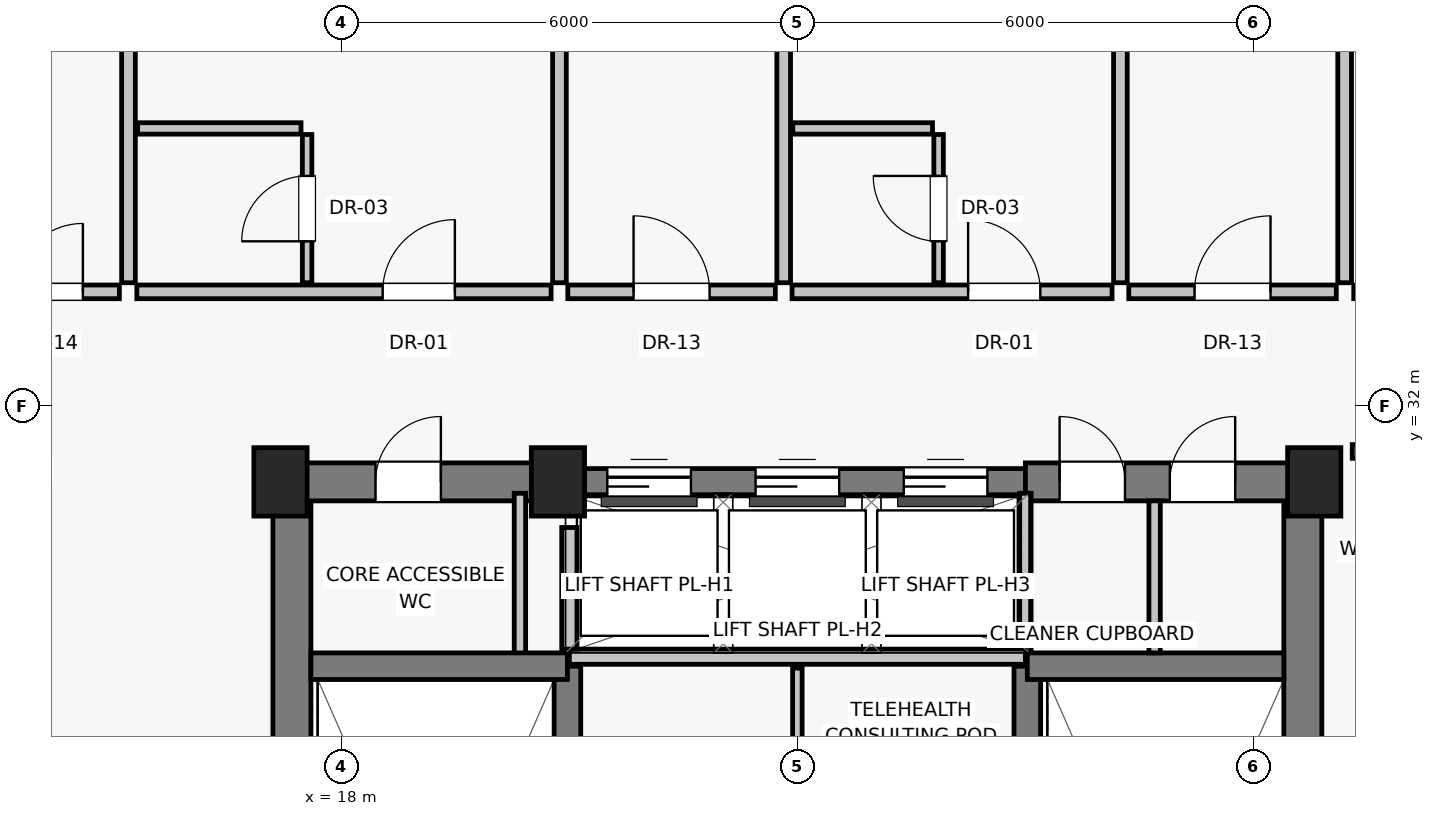
"""IFC4 building model, lengths in metres.
Left out: names, types, materials, properties, quantities, classifications, styles, units other than length and angle.
Written with IfcOpenShell. Run it as: python <this file> out.ifc"""

import sys

from ifc_helpers import new_model, si_unit, direction, frame, frame_2d, origin, origin_2d, place, context, subcontext, project, spatial, rectangle, extrude, source, transform, mapped, element, fill, save


model = new_model("IFC4")
c1 = context("Model", 3, precision=1e-05, world=origin(), true_north=direction((0.0, 1.0)))
c2 = subcontext(c1, "Body", "Model", "MODEL_VIEW")
j1 = project(units=[si_unit("LENGTHUNIT", "METRE"), si_unit("PLANEANGLEUNIT", "RADIAN")], contexts=[c1])
p1 = place(None, origin())
s1 = spatial("IfcSite", under=j1, at=p1, CompositionType="ELEMENT")
p2 = place(p1, origin())
s2 = spatial("IfcBuilding", under=s1, at=p2, CompositionType="ELEMENT")
p3 = place(p2, frame((0.0, 0.0, 195.1)))
s3 = spatial("IfcBuildingStorey", under=s2, at=p3, CompositionType="ELEMENT", Elevation=195.1)
for number, where, z_axis, x_axis in (
    (1, (17.2, 31.0, 0.0), (0.0, 0.0, 1.0), (1.0, 0.0, 0.0)),
    (2, (20.85, 31.0, 0.0), (0.0, 0.0, 1.0), (1.0, 0.0, 0.0)),
    (3, (30.8, 31.0, 0.0), (0.0, 0.0, 1.0), (1.0, 0.0, 0.0)),
):
    element("IfcColumn", number, at=place(p3, frame(where, z_axis=z_axis, x_axis=x_axis)), inside=s3, PredefinedType="PILASTER", context=c2, shape_type="SweptSolid", body=[
        extrude(rectangle(XDim=0.7, YDim=0.9, at=origin_2d()), origin(), (0.0, 0.0, 1.0), 3.25),
    ])
for number, where, z_axis, x_axis in (
    (4, (17.35, 16.8, 0.0), (0.0, 0.0, 1.0), (0.0, 1.0, 0.0)),
    (5, (30.65, 16.8, 0.0), (0.0, 0.0, 1.0), (0.0, 1.0, 0.0)),
):
    element("IfcWall", number, at=place(p3, frame(where, z_axis=z_axis, x_axis=x_axis)), inside=s3, PredefinedType="SHEAR", context=c2, shape_type="SweptSolid", body=[
        extrude(rectangle(XDim=14.2, YDim=0.5, at=frame_2d((7.1, 0.0))), origin(), (0.0, 0.0, 1.0), 3.015),
    ])
p4 = place(p3, frame((17.2, 31.0, 0.0), z_axis=(0.0, 0.0, 1.0), x_axis=(1.0, 0.0, 0.0)))
e6 = element("IfcWall", 6, at=p4, inside=s3, PredefinedType="SHEAR", context=c2, shape_type="SweptSolid", body=[
    extrude(rectangle(XDim=3.8, YDim=0.5, at=frame_2d((1.9, 0.0))), origin(), (0.0, 0.0, 1.0), 3.015),
])
p5 = place(p4, frame((1.25, 0.0, 0.0)))
e7 = element("IfcOpeningElement", 7, at=p5, cuts=e6, PredefinedType="OPENING", context=c2, shape_type="SweptSolid", body=[
    extrude(rectangle(XDim=0.86, YDim=2.01, at=frame_2d((0.43, 1.005))), frame((0.0, 0.26, 0.0), z_axis=(0.0, -1.0, 0.0), x_axis=(1.0, 0.0, 0.0)), (0.0, 0.0, 1.0), 0.52),
])
p6 = place(p3, frame((21.0, 31.0, 0.0), z_axis=(0.0, 0.0, 1.0), x_axis=(1.0, 0.0, 0.0)))
e8 = element("IfcWall", 8, at=p6, inside=s3, PredefinedType="SHEAR", context=c2, shape_type="SweptSolid", body=[
    extrude(rectangle(XDim=6.0, YDim=0.35, at=frame_2d((3.0, 0.0))), origin(), (0.0, 0.0, 1.0), 3.015),
])
p7 = place(p6, frame((0.5, 0.0, 0.0)))
e9 = element("IfcOpeningElement", 9, at=p7, cuts=e8, PredefinedType="OPENING", context=c2, shape_type="SweptSolid", body=[
    extrude(rectangle(XDim=1.1, YDim=2.08, at=frame_2d((0.55, 1.04))), frame((0.0, 0.185, 0.0), z_axis=(0.0, -1.0, 0.0), x_axis=(1.0, 0.0, 0.0)), (0.0, 0.0, 1.0), 0.37),
])
p8 = place(p6, frame((2.45, 0.0, 0.0)))
e10 = element("IfcOpeningElement", 10, at=p8, cuts=e8, PredefinedType="OPENING", context=c2, shape_type="SweptSolid", body=[
    extrude(rectangle(XDim=1.1, YDim=2.08, at=frame_2d((0.55, 1.04))), frame((0.0, 0.185, 0.0), z_axis=(0.0, -1.0, 0.0), x_axis=(1.0, 0.0, 0.0)), (0.0, 0.0, 1.0), 0.37),
])
p9 = place(p6, frame((4.4, 0.0, 0.0)))
e11 = element("IfcOpeningElement", 11, at=p9, cuts=e8, PredefinedType="OPENING", context=c2, shape_type="SweptSolid", body=[
    extrude(rectangle(XDim=1.1, YDim=2.08, at=frame_2d((0.55, 1.04))), frame((0.0, 0.185, 0.0), z_axis=(0.0, -1.0, 0.0), x_axis=(1.0, 0.0, 0.0)), (0.0, 0.0, 1.0), 0.37),
])
p10 = place(p3, frame((27.0, 31.0, 0.0), z_axis=(0.0, 0.0, 1.0), x_axis=(1.0, 0.0, 0.0)))
e12 = element("IfcWall", 12, at=p10, inside=s3, PredefinedType="SHEAR", context=c2, shape_type="SweptSolid", body=[
    extrude(rectangle(XDim=3.8, YDim=0.5, at=frame_2d((1.9, 0.0))), origin(), (0.0, 0.0, 1.0), 3.015),
])
p11 = place(p10, frame((0.45, 0.0, 0.0)))
e13 = element("IfcOpeningElement", 13, at=p11, cuts=e12, PredefinedType="OPENING", context=c2, shape_type="SweptSolid", body=[
    extrude(rectangle(XDim=0.86, YDim=2.01, at=frame_2d((0.43, 1.005))), frame((0.0, 0.26, 0.0), z_axis=(0.0, -1.0, 0.0), x_axis=(1.0, 0.0, 0.0)), (0.0, 0.0, 1.0), 0.52),
])
p12 = place(p10, frame((1.9, 0.0, 0.0)))
e14 = element("IfcOpeningElement", 14, at=p12, cuts=e12, PredefinedType="OPENING", context=c2, shape_type="SweptSolid", body=[
    extrude(rectangle(XDim=0.86, YDim=2.01, at=frame_2d((0.43, 1.005))), frame((0.0, 0.26, 0.0), z_axis=(0.0, -1.0, 0.0), x_axis=(1.0, 0.0, 0.0)), (0.0, 0.0, 1.0), 0.52),
])
for number, where, z_axis, x_axis in (
    (15, (20.35, 28.65, 0.0), (0.0, 0.0, 1.0), (0.0, 1.0, 0.0)),
    (16, (27.0, 28.65, 0.0), (0.0, 0.0, 1.0), (0.0, 1.0, 0.0)),
):
    element("IfcWall", number, at=place(p3, frame(where, z_axis=z_axis, x_axis=x_axis)), inside=s3, PredefinedType="PARTITIONING", context=c2, shape_type="SweptSolid", body=[
        extrude(rectangle(XDim=2.2, YDim=0.15, at=frame_2d((1.1, 0.0))), origin(), (0.0, 0.0, 1.0), 3.015),
    ])
for number, where, z_axis, x_axis in (
    (17, (20.975, 19.8, 0.0), (0.0, 0.0, 1.0), (0.0, 1.0, 0.0)),
    (18, (27.025, 19.8, 0.0), (0.0, 0.0, 1.0), (0.0, 1.0, 0.0)),
):
    element("IfcWall", number, at=place(p3, frame(where, z_axis=z_axis, x_axis=x_axis)), inside=s3, PredefinedType="SHEAR", context=c2, shape_type="SweptSolid", body=[
        extrude(rectangle(XDim=8.775, YDim=0.35, at=frame_2d((4.387, 0.0))), origin(), (0.0, 0.0, 1.0), 3.015),
    ])
for number, where, z_axis, x_axis in (
    (19, (17.6, 28.575, 0.0), (0.0, 0.0, 1.0), (1.0, 0.0, 0.0)),
    (20, (27.025, 28.575, 0.0), (0.0, 0.0, 1.0), (1.0, 0.0, 0.0)),
):
    element("IfcWall", number, at=place(p3, frame(where, z_axis=z_axis, x_axis=x_axis)), inside=s3, PredefinedType="SHEAR", context=c2, shape_type="SweptSolid", body=[
        extrude(rectangle(XDim=3.375, YDim=0.35, at=frame_2d((1.688, 0.0))), origin(), (0.0, 0.0, 1.0), 3.015),
    ])
p13 = place(p3, frame((21.0, 28.7, 0.0), z_axis=(0.0, 0.0, 1.0), x_axis=(1.0, 0.0, 0.0)))
e21 = element("IfcWall", 21, at=p13, inside=s3, PredefinedType="SOLIDWALL", context=c2, shape_type="SweptSolid", body=[
    extrude(rectangle(XDim=6.0, YDim=0.2, at=frame_2d((3.0, 0.0))), origin(), (0.0, 0.0, 1.0), 3.015),
])
p14 = place(p3, frame((21.0, 28.8, 0.0), z_axis=(0.0, 0.0, 1.0), x_axis=(0.0, 1.0, 0.0)))
e22 = element("IfcWall", 22, at=p14, inside=s3, PredefinedType="SOLIDWALL", context=c2, shape_type="SweptSolid", body=[
    extrude(rectangle(XDim=1.6, YDim=0.2, at=frame_2d((0.8, 0.0))), origin(), (0.0, 0.0, 1.0), 3.015),
])
p15 = place(p3, frame((24.0, 24.2, 0.0), z_axis=(0.0, 0.0, 1.0), x_axis=(0.0, 1.0, 0.0)))
e23 = element("IfcWall", 23, at=p15, inside=s3, PredefinedType="PARTITIONING", context=c2, shape_type="SweptSolid", body=[
    extrude(rectangle(XDim=4.35, YDim=0.125, at=frame_2d((2.175, 0.0))), origin(), (0.0, 0.0, 1.0), 3.015),
])
p16 = place(p15, frame((1.6, 0.0, 0.0)))
e24 = element("IfcOpeningElement", 24, at=p16, cuts=e23, PredefinedType="OPENING", context=c2, shape_type="SweptSolid", body=[
    extrude(rectangle(XDim=0.9, YDim=2.01, at=frame_2d((0.45, 1.005))), frame((0.0, 0.073, 0.0), z_axis=(0.0, -1.0, 0.0), x_axis=(1.0, 0.0, 0.0)), (0.0, 0.0, 1.0), 0.145),
])
p17 = place(p3, frame((28.7, 28.75, 0.0), z_axis=(0.0, 0.0, 1.0), x_axis=(0.0, 1.0, 0.0)))
e25 = element("IfcWall", 25, at=p17, inside=s3, PredefinedType="PARTITIONING", context=c2, shape_type="SweptSolid", body=[
    extrude(rectangle(XDim=2.0, YDim=0.15, at=frame_2d((1.0, 0.0))), origin(), (0.0, 0.0, 1.0), 3.015),
])
p18 = place(p3, frame((15.2, 33.62, 0.0), z_axis=(0.0, 0.0, 1.0), x_axis=(0.0, 1.0, 0.0)))
e26 = element("IfcWall", 26, at=p18, inside=s3, PredefinedType="PARTITIONING", context=c2, shape_type="SweptSolid", body=[
    extrude(rectangle(XDim=5.825, YDim=0.18, at=frame_2d((2.913, 0.0))), origin(), (0.0, 0.0, 1.0), 3.015),
])
p19 = place(p3, frame((31.2, 33.62, 0.0), z_axis=(0.0, 0.0, 1.0), x_axis=(0.0, 1.0, 0.0)))
e27 = element("IfcWall", 27, at=p19, inside=s3, PredefinedType="PARTITIONING", context=c2, shape_type="SweptSolid", body=[
    extrude(rectangle(XDim=6.616, YDim=0.18, at=frame_2d((3.308, 0.0))), origin(), (0.0, 0.0, 1.0), 3.015),
])
p20 = place(p3, frame((20.98, 33.5, 0.0), z_axis=(0.0, 0.0, 1.0), x_axis=(1.0, 0.0, 0.0)))
e28 = element("IfcWall", 28, at=p20, inside=s3, PredefinedType="PARTITIONING", context=c2, shape_type="SweptSolid", body=[
    extrude(rectangle(XDim=2.73, YDim=0.18, at=frame_2d((1.365, 0.0))), origin(), (0.0, 0.0, 1.0), 3.015),
])
p21 = place(p20, frame((0.865, 0.0, 0.0)))
e29 = element("IfcOpeningElement", 29, at=p21, cuts=e28, PredefinedType="OPENING", context=c2, shape_type="SweptSolid", body=[
    extrude(rectangle(XDim=1.0, YDim=2.01, at=frame_2d((0.5, 1.005))), frame((0.0, 0.1, 0.0), z_axis=(0.0, -1.0, 0.0), x_axis=(1.0, 0.0, 0.0)), (0.0, 0.0, 1.0), 0.2),
])
p22 = place(p3, frame((20.87, 33.62, 0.0), z_axis=(0.0, 0.0, 1.0), x_axis=(0.0, 1.0, 0.0)))
e30 = element("IfcWall", 30, at=p22, inside=s3, PredefinedType="PARTITIONING", context=c2, shape_type="SweptSolid", body=[
    extrude(rectangle(XDim=9.552, YDim=0.18, at=frame_2d((4.776, 0.0))), origin(), (0.0, 0.0, 1.0), 3.015),
])
p23 = place(p3, frame((15.31, 33.5, 0.0), z_axis=(0.0, 0.0, 1.0), x_axis=(1.0, 0.0, 0.0)))
e31 = element("IfcWall", 31, at=p23, inside=s3, PredefinedType="PARTITIONING", context=c2, shape_type="SweptSolid", body=[
    extrude(rectangle(XDim=5.45, YDim=0.18, at=frame_2d((2.725, 0.0))), origin(), (0.0, 0.0, 1.0), 3.015),
])
p24 = place(p23, frame((3.234, 0.0, 0.0)))
e32 = element("IfcOpeningElement", 32, at=p24, cuts=e31, PredefinedType="OPENING", context=c2, shape_type="SweptSolid", body=[
    extrude(rectangle(XDim=0.95, YDim=2.02, at=frame_2d((0.475, 1.01))), frame((0.0, 0.1, 0.0), z_axis=(0.0, -1.0, 0.0), x_axis=(1.0, 0.0, 0.0)), (0.0, 0.0, 1.0), 0.2),
])
p25 = place(p3, frame((17.55, 33.62, 0.0), z_axis=(0.0, 0.0, 1.0), x_axis=(0.0, 1.0, 0.0)))
e33 = element("IfcWall", 33, at=p25, inside=s3, PredefinedType="PARTITIONING", context=c2, shape_type="SweptSolid", body=[
    extrude(rectangle(XDim=1.95, YDim=0.125, at=frame_2d((0.975, 0.0))), origin(), (0.0, 0.0, 1.0), 3.015),
])
p26 = place(p25, frame((0.545, 0.0, 0.0)))
e34 = element("IfcOpeningElement", 34, at=p26, cuts=e33, PredefinedType="OPENING", context=c2, shape_type="SweptSolid", body=[
    extrude(rectangle(XDim=0.86, YDim=2.01, at=frame_2d((0.43, 1.005))), frame((0.0, 0.073, 0.0), z_axis=(0.0, -1.0, 0.0), x_axis=(1.0, 0.0, 0.0)), (0.0, 0.0, 1.0), 0.145),
])
p27 = place(p3, frame((15.32, 35.65, 0.0), z_axis=(0.0, 0.0, 1.0), x_axis=(1.0, 0.0, 0.0)))
e35 = element("IfcWall", 35, at=p27, inside=s3, PredefinedType="PARTITIONING", context=c2, shape_type="SweptSolid", body=[
    extrude(rectangle(XDim=2.15, YDim=0.15, at=frame_2d((1.075, 0.0))), origin(), (0.0, 0.0, 1.0), 3.015),
])
p28 = place(p3, frame((23.82, 33.62, 0.0), z_axis=(0.0, 0.0, 1.0), x_axis=(0.0, 1.0, 0.0)))
e36 = element("IfcWall", 36, at=p28, inside=s3, PredefinedType="PARTITIONING", context=c2, shape_type="SweptSolid", body=[
    extrude(rectangle(XDim=9.775, YDim=0.18, at=frame_2d((4.888, 0.0))), origin(), (0.0, 0.0, 1.0), 3.015),
])
p29 = place(p3, frame((28.36, 33.5, 0.0), z_axis=(0.0, 0.0, 1.0), x_axis=(1.0, 0.0, 0.0)))
e37 = element("IfcWall", 37, at=p29, inside=s3, PredefinedType="PARTITIONING", context=c2, shape_type="SweptSolid", body=[
    extrude(rectangle(XDim=2.73, YDim=0.18, at=frame_2d((1.365, 0.0))), origin(), (0.0, 0.0, 1.0), 3.015),
])
p30 = place(p29, frame((0.865, 0.0, 0.0)))
e38 = element("IfcOpeningElement", 38, at=p30, cuts=e37, PredefinedType="OPENING", context=c2, shape_type="SweptSolid", body=[
    extrude(rectangle(XDim=1.0, YDim=2.01, at=frame_2d((0.5, 1.005))), frame((0.0, 0.1, 0.0), z_axis=(0.0, -1.0, 0.0), x_axis=(1.0, 0.0, 0.0)), (0.0, 0.0, 1.0), 0.2),
])
p31 = place(p3, frame((28.25, 33.62, 0.0), z_axis=(0.0, 0.0, 1.0), x_axis=(0.0, 1.0, 0.0)))
e39 = element("IfcWall", 39, at=p31, inside=s3, PredefinedType="PARTITIONING", context=c2, shape_type="SweptSolid", body=[
    extrude(rectangle(XDim=8.098, YDim=0.18, at=frame_2d((4.049, 0.0))), origin(), (0.0, 0.0, 1.0), 2.469),
])
p32 = place(p3, frame((23.93, 33.5, 0.0), z_axis=(0.0, 0.0, 1.0), x_axis=(1.0, 0.0, 0.0)))
e40 = element("IfcWall", 40, at=p32, inside=s3, PredefinedType="PARTITIONING", context=c2, shape_type="SweptSolid", body=[
    extrude(rectangle(XDim=4.21, YDim=0.18, at=frame_2d((2.105, 0.0))), origin(), (0.0, 0.0, 1.0), 3.015),
])
p33 = place(p32, frame((2.316, 0.0, 0.0)))
e41 = element("IfcOpeningElement", 41, at=p33, cuts=e40, PredefinedType="OPENING", context=c2, shape_type="SweptSolid", body=[
    extrude(rectangle(XDim=0.95, YDim=2.02, at=frame_2d((0.475, 1.01))), frame((0.0, 0.1, 0.0), z_axis=(0.0, -1.0, 0.0), x_axis=(1.0, 0.0, 0.0)), (0.0, 0.0, 1.0), 0.2),
])
p34 = place(p3, frame((25.858, 33.62, 0.0), z_axis=(0.0, 0.0, 1.0), x_axis=(0.0, 1.0, 0.0)))
e42 = element("IfcWall", 42, at=p34, inside=s3, PredefinedType="PARTITIONING", context=c2, shape_type="SweptSolid", body=[
    extrude(rectangle(XDim=1.95, YDim=0.125, at=frame_2d((0.975, 0.0))), origin(), (0.0, 0.0, 1.0), 3.015),
])
p35 = place(p34, frame((0.545, 0.0, 0.0)))
e43 = element("IfcOpeningElement", 43, at=p35, cuts=e42, PredefinedType="OPENING", context=c2, shape_type="SweptSolid", body=[
    extrude(rectangle(XDim=0.86, YDim=2.01, at=frame_2d((0.43, 1.005))), frame((0.0, 0.073, 0.0), z_axis=(0.0, -1.0, 0.0), x_axis=(1.0, 0.0, 0.0)), (0.0, 0.0, 1.0), 0.145),
])
p36 = place(p3, frame((23.94, 35.65, 0.0), z_axis=(0.0, 0.0, 1.0), x_axis=(1.0, 0.0, 0.0)))
e44 = element("IfcWall", 44, at=p36, inside=s3, PredefinedType="PARTITIONING", context=c2, shape_type="SweptSolid", body=[
    extrude(rectangle(XDim=1.838, YDim=0.15, at=frame_2d((0.919, 0.0))), origin(), (0.0, 0.0, 1.0), 2.662),
])
p37 = place(p3, frame((31.3, 31.4, 0.0), z_axis=(0.0, 0.0, 1.0), x_axis=(1.0, 0.0, 0.0)))
e45 = element("IfcWall", 45, at=p37, inside=s3, PredefinedType="PARTITIONING", context=c2, shape_type="SweptSolid", body=[
    extrude(rectangle(XDim=1.92, YDim=0.18, at=frame_2d((0.96, 0.0))), origin(), (0.0, 0.0, 1.0), 3.015),
])
p38 = place(p37, frame((0.72, 0.0, 0.0)))
e46 = element("IfcOpeningElement", 46, at=p38, cuts=e45, PredefinedType="OPENING", context=c2, shape_type="SweptSolid", body=[
    extrude(rectangle(XDim=1.0, YDim=2.01, at=frame_2d((0.5, 1.005))), frame((0.0, 0.1, 0.0), z_axis=(0.0, -1.0, 0.0), x_axis=(1.0, 0.0, 0.0)), (0.0, 0.0, 1.0), 0.2),
])
p39 = place(p3, frame((13.22, 33.5, 0.0), z_axis=(0.0, 0.0, 1.0), x_axis=(1.0, 0.0, 0.0)))
e47 = element("IfcWall", 47, at=p39, inside=s3, PredefinedType="PARTITIONING", context=c2, shape_type="SweptSolid", body=[
    extrude(rectangle(XDim=1.86, YDim=0.18, at=frame_2d((0.93, 0.0))), origin(), (0.0, 0.0, 1.0), 3.015),
])
p40 = place(p39, frame((0.48, 0.0, 0.0)))
e48 = element("IfcOpeningElement", 48, at=p40, cuts=e47, PredefinedType="OPENING", context=c2, shape_type="SweptSolid", body=[
    extrude(rectangle(XDim=0.9, YDim=2.01, at=frame_2d((0.45, 1.005))), frame((0.0, 0.1, 0.0), z_axis=(0.0, -1.0, 0.0), x_axis=(1.0, 0.0, 0.0)), (0.0, 0.0, 1.0), 0.2),
])
p41 = place(p3, frame((31.32, 33.5, 0.0), z_axis=(0.0, 0.0, 1.0), x_axis=(1.0, 0.0, 0.0)))
e49 = element("IfcWall", 49, at=p41, inside=s3, PredefinedType="PARTITIONING", context=c2, shape_type="SweptSolid", body=[
    extrude(rectangle(XDim=1.86, YDim=0.18, at=frame_2d((0.93, 0.0))), origin(), (0.0, 0.0, 1.0), 3.015),
])
p42 = place(p41, frame((0.48, 0.0, 0.0)))
e50 = element("IfcOpeningElement", 50, at=p42, cuts=e49, PredefinedType="OPENING", context=c2, shape_type="SweptSolid", body=[
    extrude(rectangle(XDim=0.9, YDim=2.01, at=frame_2d((0.45, 1.005))), frame((0.0, 0.1, 0.0), z_axis=(0.0, -1.0, 0.0), x_axis=(1.0, 0.0, 0.0)), (0.0, 0.0, 1.0), 0.2),
])
m1 = source(origin(), c2, "Body", "SweptSolid", [
    extrude(rectangle(XDim=0.86, YDim=2.01, at=frame_2d((0.43, 1.005))), frame((0.0, 0.025, 0.0), z_axis=(0.0, -1.0, 0.0), x_axis=(1.0, 0.0, 0.0)), (0.0, 0.0, 1.0), 0.05),
])
p43 = place(p5, origin())
e51 = element("IfcDoor", 51, at=p43, inside=s3, OperationType="SINGLE_SWING_RIGHT", PredefinedType="DOOR", context=c2, shape_type="MappedRepresentation", body=[
    mapped(m1, transform((0.0, 0.0, 0.0), scale=1.0)),
])
fill(e7, e51)
m2 = source(origin(), c2, "Body", "SweptSolid", [
    extrude(rectangle(XDim=1.1, YDim=2.08, at=frame_2d((0.55, 1.04))), frame((0.0, 0.025, 0.0), z_axis=(0.0, -1.0, 0.0), x_axis=(1.0, 0.0, 0.0)), (0.0, 0.0, 1.0), 0.05),
])
p44 = place(p7, origin())
e52 = element("IfcDoor", 52, at=p44, inside=s3, OperationType="SLIDING_TO_LEFT", PredefinedType="DOOR", context=c2, shape_type="MappedRepresentation", body=[
    mapped(m2, transform((0.0, 0.0, 0.0), scale=1.0)),
])
fill(e9, e52)
p45 = place(p8, origin())
e53 = element("IfcDoor", 53, at=p45, inside=s3, OperationType="SLIDING_TO_LEFT", PredefinedType="DOOR", context=c2, shape_type="MappedRepresentation", body=[
    mapped(m2, transform((0.0, 0.0, 0.0), scale=1.0)),
])
fill(e10, e53)
p46 = place(p9, origin())
e54 = element("IfcDoor", 54, at=p46, inside=s3, OperationType="SLIDING_TO_LEFT", PredefinedType="DOOR", context=c2, shape_type="MappedRepresentation", body=[
    mapped(m2, transform((0.0, 0.0, 0.0), scale=1.0)),
])
fill(e11, e54)
p47 = place(p11, origin())
e55 = element("IfcDoor", 55, at=p47, inside=s3, OperationType="SINGLE_SWING_LEFT", PredefinedType="DOOR", context=c2, shape_type="MappedRepresentation", body=[
    mapped(m1, transform((0.0, 0.0, 0.0), scale=1.0)),
])
fill(e13, e55)
p48 = place(p12, origin())
e56 = element("IfcDoor", 56, at=p48, inside=s3, OperationType="SINGLE_SWING_RIGHT", PredefinedType="DOOR", context=c2, shape_type="MappedRepresentation", body=[
    mapped(m1, transform((0.0, 0.0, 0.0), scale=1.0)),
])
fill(e14, e56)
m3 = source(origin(), c2, "Body", "SweptSolid", [
    extrude(rectangle(XDim=1.0, YDim=2.01, at=frame_2d((0.5, 1.005))), frame((0.0, 0.025, 0.0), z_axis=(0.0, -1.0, 0.0), x_axis=(1.0, 0.0, 0.0)), (0.0, 0.0, 1.0), 0.05),
])
p49 = place(p21, origin())
e57 = element("IfcDoor", 57, at=p49, inside=s3, OperationType="SINGLE_SWING_LEFT", PredefinedType="DOOR", context=c2, shape_type="MappedRepresentation", body=[
    mapped(m3, transform((0.0, 0.0, 0.0), scale=1.0)),
])
fill(e29, e57)
m4 = source(origin(), c2, "Body", "SweptSolid", [
    extrude(rectangle(XDim=0.95, YDim=2.02, at=frame_2d((0.475, 1.01))), frame((0.0, 0.025, 0.0), z_axis=(0.0, -1.0, 0.0), x_axis=(1.0, 0.0, 0.0)), (0.0, 0.0, 1.0), 0.05),
])
p50 = place(p24, origin())
e58 = element("IfcDoor", 58, at=p50, inside=s3, OperationType="SINGLE_SWING_RIGHT", PredefinedType="DOOR", context=c2, shape_type="MappedRepresentation", body=[
    mapped(m4, transform((0.0, 0.0, 0.0), scale=1.0)),
])
fill(e32, e58)
p51 = place(p26, origin())
e59 = element("IfcDoor", 59, at=p51, inside=s3, OperationType="SINGLE_SWING_LEFT", PredefinedType="DOOR", context=c2, shape_type="MappedRepresentation", body=[
    mapped(m1, transform((0.0, 0.0, 0.0), scale=1.0)),
])
fill(e34, e59)
p52 = place(p30, origin())
e60 = element("IfcDoor", 60, at=p52, inside=s3, OperationType="SINGLE_SWING_RIGHT", PredefinedType="DOOR", context=c2, shape_type="MappedRepresentation", body=[
    mapped(m3, transform((0.0, 0.0, 0.0), scale=1.0)),
])
fill(e38, e60)
p53 = place(p33, origin())
e61 = element("IfcDoor", 61, at=p53, inside=s3, OperationType="SINGLE_SWING_LEFT", PredefinedType="DOOR", context=c2, shape_type="MappedRepresentation", body=[
    mapped(m4, transform((0.0, 0.0, 0.0), scale=1.0)),
])
fill(e41, e61)
p54 = place(p35, origin())
e62 = element("IfcDoor", 62, at=p54, inside=s3, OperationType="SINGLE_SWING_RIGHT", PredefinedType="DOOR", context=c2, shape_type="MappedRepresentation", body=[
    mapped(m1, transform((0.0, 0.0, 0.0), scale=1.0)),
])
fill(e43, e62)
m5 = source(origin(), c2, "Body", "SweptSolid", [
    extrude(rectangle(XDim=0.9, YDim=2.01, at=frame_2d((0.45, 1.005))), frame((0.0, 0.025, 0.0), z_axis=(0.0, -1.0, 0.0), x_axis=(1.0, 0.0, 0.0)), (0.0, 0.0, 1.0), 0.05),
])
p55 = place(p40, origin())
e63 = element("IfcDoor", 63, at=p55, inside=s3, OperationType="SINGLE_SWING_RIGHT", PredefinedType="DOOR", context=c2, shape_type="MappedRepresentation", body=[
    mapped(m5, transform((0.0, 0.0, 0.0), scale=1.0)),
])
fill(e48, e63)
save(model, sys.argv[1])
